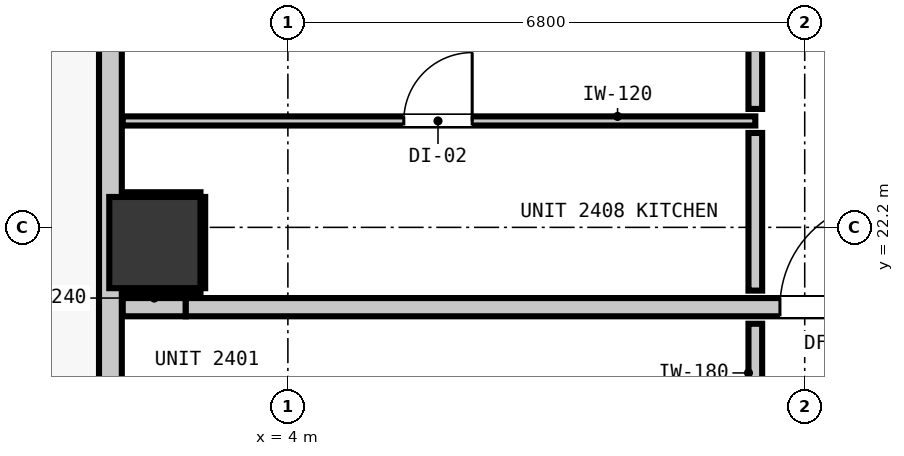
"""IFC4 building model, lengths in metres.
Left out: names, types, materials, properties, quantities, classifications, styles, units other than length and angle.
Written with IfcOpenShell. Run it as: python <this file> out.ifc"""

import sys

from ifc_helpers import new_model, si_unit, direction, frame, frame_2d, origin, origin_2d, place, context, subcontext, project, spatial, rectangle, extrude, element, fill, save


model = new_model("IFC4")
c1 = context("Model", 3, precision=1e-05, world=origin(), true_north=direction((0.0, 1.0)))
c2 = subcontext(c1, "Body", "Model", "MODEL_VIEW")
j1 = project(units=[si_unit("LENGTHUNIT", "METRE"), si_unit("PLANEANGLEUNIT", "RADIAN")], contexts=[c1])
p1 = place(None, origin())
s1 = spatial("IfcSite", under=j1, at=p1, CompositionType="ELEMENT")
p2 = place(p1, origin())
s2 = spatial("IfcBuilding", under=s1, at=p2, CompositionType="ELEMENT")
p3 = place(p2, frame((0.0, 0.0, 85.08)))
s3 = spatial("IfcBuildingStorey", under=s2, at=p3, CompositionType="ELEMENT", Elevation=85.08)
p4 = place(p3, frame((2.25, 22.0, 0.0), z_axis=(0.0, 0.0, 1.0), x_axis=(1.0, 0.0, 0.0)))
e1 = element("IfcColumn", 1, at=p4, inside=s3, PredefinedType="COLUMN", context=c2, shape_type="SweptSolid", body=[
    extrude(rectangle(XDim=1.2, YDim=1.2, at=origin_2d()), origin(), (0.0, 0.0, 1.0), 3.32),
])
p5 = place(p3, frame((1.665, 16.365, 0.0), z_axis=(0.0, 0.0, 1.0), x_axis=(0.0, 1.0, 0.0)))
e2 = element("IfcWall", 2, at=p5, inside=s3, PredefinedType="STANDARD", context=c2, shape_type="SweptSolid", body=[
    extrude(rectangle(XDim=34.67, YDim=0.3, at=frame_2d((17.335, 0.0))), origin(), (0.0, 0.0, 1.0), 2.96),
])
p6 = place(p5, frame((1.251, 0.0, 0.0)))
e3 = element("IfcOpeningElement", 3, at=p6, cuts=e2, PredefinedType="OPENING", context=c2, shape_type="SweptSolid", body=[
    extrude(rectangle(XDim=1.0, YDim=2.15, at=frame_2d((0.5, 1.075))), frame((0.0, 0.16, 0.0), z_axis=(0.0, -1.0, 0.0), x_axis=(1.0, 0.0, 0.0)), (0.0, 0.0, 1.0), 0.32),
])
p7 = place(p5, frame((32.508, 0.0, 0.85)))
e4 = element("IfcOpeningElement", 4, at=p7, cuts=e2, PredefinedType="OPENING", context=c2, shape_type="SweptSolid", body=[
    extrude(rectangle(XDim=1.5, YDim=1.8, at=frame_2d((0.75, 0.9))), frame((0.0, 0.16, 0.0), z_axis=(0.0, -1.0, 0.0), x_axis=(1.0, 0.0, 0.0)), (0.0, 0.0, 1.0), 0.32),
])
p8 = place(p5, frame((8.323, 0.0, 0.85)))
e5 = element("IfcOpeningElement", 5, at=p8, cuts=e2, PredefinedType="OPENING", context=c2, shape_type="SweptSolid", body=[
    extrude(rectangle(XDim=1.5, YDim=1.8, at=frame_2d((0.75, 0.9))), frame((0.0, 0.16, 0.0), z_axis=(0.0, -1.0, 0.0), x_axis=(1.0, 0.0, 0.0)), (0.0, 0.0, 1.0), 0.32),
])
p9 = place(p5, frame((11.473, 0.0, 0.85)))
e6 = element("IfcOpeningElement", 6, at=p9, cuts=e2, PredefinedType="OPENING", context=c2, shape_type="SweptSolid", body=[
    extrude(rectangle(XDim=1.5, YDim=1.8, at=frame_2d((0.75, 0.9))), frame((0.0, 0.16, 0.0), z_axis=(0.0, -1.0, 0.0), x_axis=(1.0, 0.0, 0.0)), (0.0, 0.0, 1.0), 0.32),
])
p10 = place(p5, frame((17.857, 0.0, 0.85)))
e7 = element("IfcOpeningElement", 7, at=p10, cuts=e2, PredefinedType="OPENING", context=c2, shape_type="SweptSolid", body=[
    extrude(rectangle(XDim=1.5, YDim=1.8, at=frame_2d((0.75, 0.9))), frame((0.0, 0.16, 0.0), z_axis=(0.0, -1.0, 0.0), x_axis=(1.0, 0.0, 0.0)), (0.0, 0.0, 1.0), 0.32),
])
p11 = place(p5, frame((21.133, 0.0, 0.85)))
e8 = element("IfcOpeningElement", 8, at=p11, cuts=e2, PredefinedType="OPENING", context=c2, shape_type="SweptSolid", body=[
    extrude(rectangle(XDim=1.05, YDim=1.65, at=frame_2d((0.525, 0.825))), frame((0.0, 0.16, 0.0), z_axis=(0.0, -1.0, 0.0), x_axis=(1.0, 0.0, 0.0)), (0.0, 0.0, 1.0), 0.32),
])
p12 = place(p3, frame((1.827, 21.15, 0.0), z_axis=(0.0, 0.0, 1.0), x_axis=(1.0, 0.0, 0.0)))
e9 = element("IfcWall", 9, at=p12, inside=s3, PredefinedType="PARTITIONING", context=c2, shape_type="SweptSolid", body=[
    extrude(rectangle(XDim=0.83, YDim=0.24, at=frame_2d((0.415, 0.0))), origin(), (0.0, 0.0, 1.0), 2.96),
])
p13 = place(p3, frame((2.657, 21.15, 0.0), z_axis=(0.0, 0.0, 1.0), x_axis=(1.0, 0.0, 0.0)))
e10 = element("IfcWall", 10, at=p13, inside=s3, PredefinedType="PARTITIONING", context=c2, shape_type="SweptSolid", body=[
    extrude(rectangle(XDim=10.336, YDim=0.24, at=frame_2d((5.168, 0.0))), origin(), (0.0, 0.0, 1.0), 2.345),
])
p14 = place(p13, frame((7.817, 0.0, 0.0)))
e11 = element("IfcOpeningElement", 11, at=p14, cuts=e10, PredefinedType="OPENING", context=c2, shape_type="SweptSolid", body=[
    extrude(rectangle(XDim=1.4, YDim=2.15, at=frame_2d((0.7, 1.075))), frame((0.0, 0.13, 0.0), z_axis=(0.0, -1.0, 0.0), x_axis=(1.0, 0.0, 0.0)), (0.0, 0.0, 1.0), 0.26),
])
p15 = place(p3, frame((1.827, 23.6, 0.0), z_axis=(0.0, 0.0, 1.0), x_axis=(1.0, 0.0, 0.0)))
e12 = element("IfcWall", 12, at=p15, inside=s3, PredefinedType="PARTITIONING", context=c2, shape_type="SweptSolid", body=[
    extrude(rectangle(XDim=8.323, YDim=0.12, at=frame_2d((4.162, 0.0))), origin(), (0.0, 0.0, 1.0), 2.96),
])
p16 = place(p15, frame((3.698, 0.0, 0.0)))
e13 = element("IfcOpeningElement", 13, at=p16, cuts=e12, PredefinedType="OPENING", context=c2, shape_type="SweptSolid", body=[
    extrude(rectangle(XDim=0.9, YDim=2.1, at=frame_2d((0.45, 1.05))), frame((0.0, 0.07, 0.0), z_axis=(0.0, -1.0, 0.0), x_axis=(1.0, 0.0, 0.0)), (0.0, 0.0, 1.0), 0.14),
])
p17 = place(p3, frame((10.15, 19.638, 0.0), z_axis=(0.0, 0.0, 1.0), x_axis=(0.0, 1.0, 0.0)))
e14 = element("IfcWall", 14, at=p17, inside=s3, PredefinedType="PARTITIONING", context=c2, shape_type="SweptSolid", body=[
    extrude(rectangle(XDim=1.294, YDim=0.18, at=frame_2d((0.647, 0.0))), origin(), (0.0, 0.0, 1.0), 2.96),
])
p18 = place(p3, frame((10.15, 21.368, 0.0), z_axis=(0.0, 0.0, 1.0), x_axis=(0.0, 1.0, 0.0)))
e15 = element("IfcWall", 15, at=p18, inside=s3, PredefinedType="PARTITIONING", context=c2, shape_type="SweptSolid", body=[
    extrude(rectangle(XDim=2.074, YDim=0.18, at=frame_2d((1.037, 0.0))), origin(), (0.0, 0.0, 1.0), 2.96),
])
p19 = place(p3, frame((10.15, 23.758, 0.0), z_axis=(0.0, 0.0, 1.0), x_axis=(0.0, 1.0, 0.0)))
e16 = element("IfcWall", 16, at=p19, inside=s3, PredefinedType="PARTITIONING", context=c2, shape_type="SweptSolid", body=[
    extrude(rectangle(XDim=3.349, YDim=0.18, at=frame_2d((1.674, 0.0))), origin(), (0.0, 0.0, 1.0), 2.96),
])
p20 = place(p19, frame((1.18, 0.0, 0.0)))
e17 = element("IfcOpeningElement", 17, at=p20, cuts=e16, PredefinedType="OPENING", context=c2, shape_type="SweptSolid", body=[
    extrude(rectangle(XDim=1.0, YDim=2.15, at=frame_2d((0.5, 1.075))), frame((0.0, 0.1, 0.0), z_axis=(0.0, -1.0, 0.0), x_axis=(1.0, 0.0, 0.0)), (0.0, 0.0, 1.0), 0.2),
])
for number, where, z_axis, x_axis in (
    (18, (1.83, 21.368, 0.0), (0.0, 0.0, 1.0), (1.0, 0.0, 0.0)),
    (19, (1.83, 22.632, 0.0), (0.0, 0.0, 1.0), (1.0, 0.0, 0.0)),
):
    element("IfcWall", number, at=place(p3, frame(where, z_axis=z_axis, x_axis=x_axis)), inside=s3, PredefinedType="PARTITIONING", context=c2, shape_type="SweptSolid", body=[
        extrude(rectangle(XDim=1.02, YDim=0.06, at=frame_2d((0.51, 0.0))), origin(), (0.0, 0.0, 1.0), 1.45),
    ])
p21 = place(p3, frame((2.882, 21.4, 0.0), z_axis=(0.0, 0.0, 1.0), x_axis=(0.0, 1.0, 0.0)))
e20 = element("IfcWall", 20, at=p21, inside=s3, PredefinedType="PARTITIONING", context=c2, shape_type="SweptSolid", body=[
    extrude(rectangle(XDim=1.2, YDim=0.06, at=frame_2d((0.6, 0.0))), origin(), (0.0, 0.0, 1.0), 1.45),
])
p22 = place(p14, origin())
e21 = element("IfcDoor", 21, at=p22, inside=s3, OperationType="SINGLE_SWING_RIGHT", PredefinedType="DOOR", context=c2, shape_type="SweptSolid", body=[
    extrude(rectangle(XDim=1.4, YDim=2.15, at=frame_2d((0.7, 1.075))), frame((0.0, 0.025, 0.0), z_axis=(0.0, -1.0, 0.0), x_axis=(1.0, 0.0, 0.0)), (0.0, 0.0, 1.0), 0.05),
])
fill(e11, e21)
p23 = place(p16, origin())
e22 = element("IfcDoor", 22, at=p23, inside=s3, OperationType="SINGLE_SWING_RIGHT", PredefinedType="DOOR", context=c2, shape_type="SweptSolid", body=[
    extrude(rectangle(XDim=0.9, YDim=2.1, at=frame_2d((0.45, 1.05))), frame((0.0, 0.025, 0.0), z_axis=(0.0, -1.0, 0.0), x_axis=(1.0, 0.0, 0.0)), (0.0, 0.0, 1.0), 0.05),
])
fill(e13, e22)
save(model, sys.argv[1])
